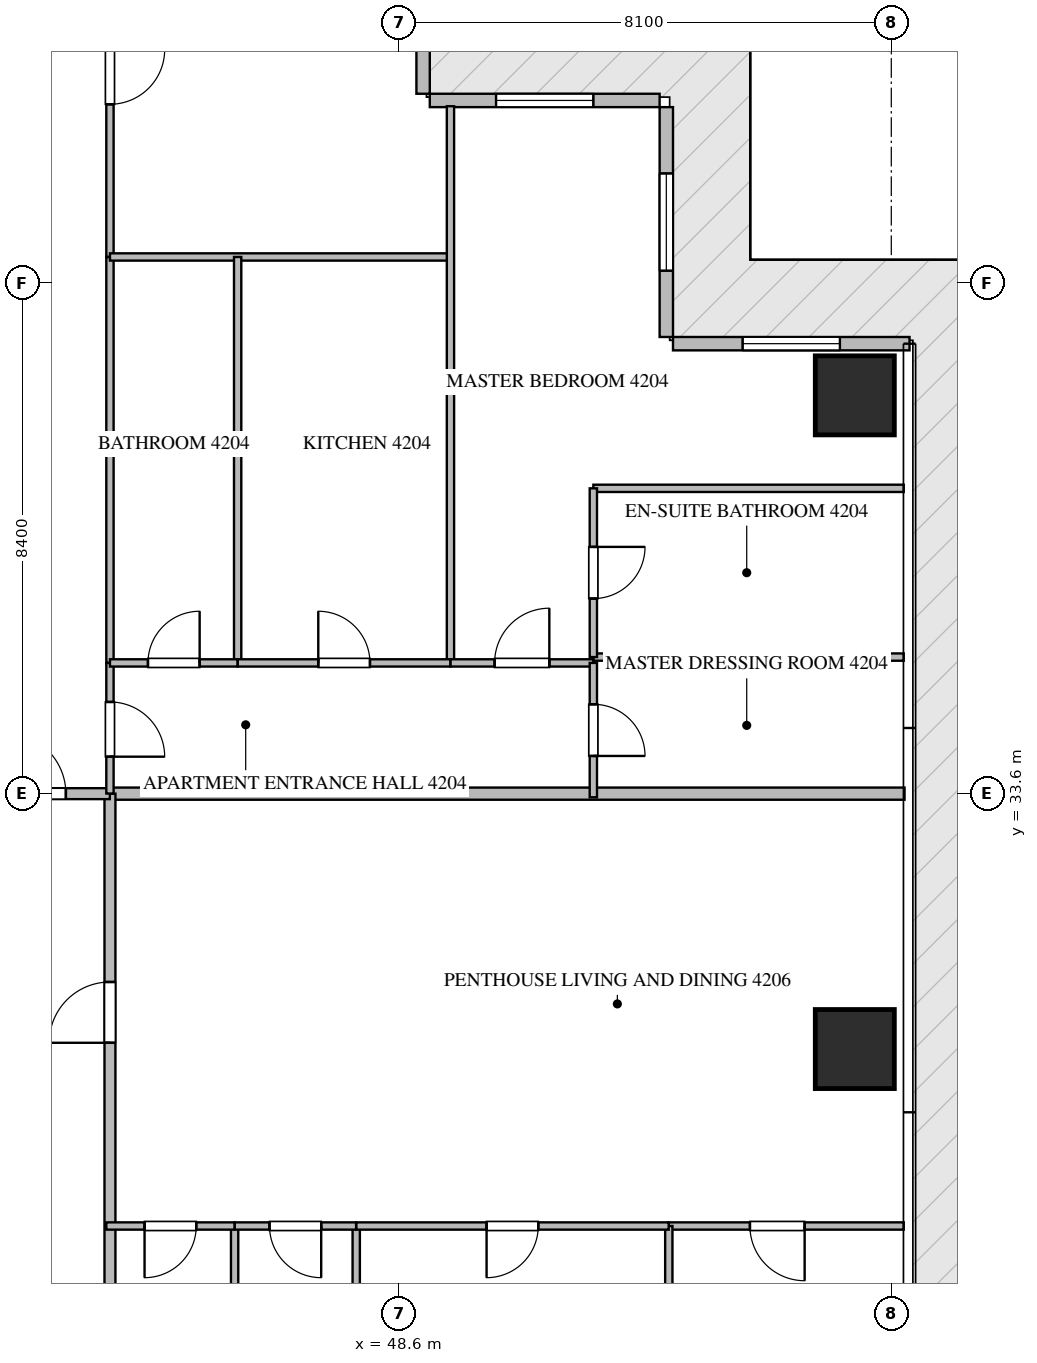
"""IFC4 building model, lengths in metres.
Left out: names, types, materials, properties, quantities, classifications, styles, units other than length and angle.
Written with IfcOpenShell. Run it as: python <this file> out.ifc"""

import sys

from ifc_helpers import new_model, si_unit, direction, frame, frame_2d, origin, origin_2d, place, context, subcontext, project, spatial, rectangle, extrude, source, transform, mapped, element, fill, save


model = new_model("IFC4")
c1 = context("Model", 3, precision=1e-05, world=origin(), true_north=direction((0.0, 1.0)))
c2 = subcontext(c1, "Body", "Model", "MODEL_VIEW")
j1 = project(units=[si_unit("LENGTHUNIT", "METRE"), si_unit("PLANEANGLEUNIT", "RADIAN")], contexts=[c1])
p1 = place(None, origin())
s1 = spatial("IfcSite", under=j1, at=p1, CompositionType="ELEMENT")
p2 = place(p1, origin())
s2 = spatial("IfcBuilding", under=s1, at=p2, CompositionType="ELEMENT")
p3 = place(p2, frame((0.0, 0.0, 168.9)))
s3 = spatial("IfcBuildingStorey", under=s2, at=p3, CompositionType="ELEMENT", Elevation=168.9)
m1 = source(origin(), c2, "Body", "SweptSolid", [
    extrude(rectangle(XDim=1.3, YDim=1.3, at=origin_2d()), origin(), (0.0, 0.0, 1.0), 3.75),
])
for number, where, z_axis, x_axis in (
    (1, (56.1, 29.4, -0.26), (0.0, 0.0, 1.0), (1.0, 0.0, 0.0)),
    (2, (56.1, 40.15, -0.26), (0.0, 0.0, 1.0), (1.0, 0.0, 0.0)),
):
    element("IfcColumn", number, at=place(p3, frame(where, z_axis=z_axis, x_axis=x_axis)), inside=s3, PredefinedType="COLUMN", context=c2, shape_type="MappedRepresentation", body=[
        mapped(m1, transform((0.0, 0.0, 0.0), scale=1.0)),
    ])
p4 = place(p3, frame((57.0, 41.0, 0.0), z_axis=(0.0, 0.0, 1.0), x_axis=(-1.0, 0.0, 0.0)))
e3 = element("IfcWall", 3, at=p4, inside=s3, PredefinedType="ELEMENTEDWALL", context=c2, shape_type="SweptSolid", body=[
    extrude(rectangle(XDim=3.89, YDim=0.22, at=frame_2d((1.945, 0.0))), origin(), (0.0, 0.0, 1.0), 3.475),
])
p5 = place(p4, frame((1.145, 0.0, 0.65)))
e4 = element("IfcOpeningElement", 4, at=p5, cuts=e3, PredefinedType="OPENING", context=c2, shape_type="SweptSolid", body=[
    extrude(rectangle(XDim=1.6, YDim=2.1, at=frame_2d((0.8, 1.05))), frame((0.0, 0.12, 0.0), z_axis=(0.0, -1.0, 0.0), x_axis=(1.0, 0.0, 0.0)), (0.0, 0.0, 1.0), 0.24),
])
p6 = place(p3, frame((53.0, 41.11, 0.0), z_axis=(0.0, 0.0, 1.0), x_axis=(0.0, 1.0, 0.0)))
e5 = element("IfcWall", 5, at=p6, inside=s3, PredefinedType="ELEMENTEDWALL", context=c2, shape_type="SweptSolid", body=[
    extrude(rectangle(XDim=3.78, YDim=0.22, at=frame_2d((1.89, 0.0))), origin(), (0.0, 0.0, 1.0), 3.475),
])
p7 = place(p6, frame((1.09, 0.0, 0.65)))
e6 = element("IfcOpeningElement", 6, at=p7, cuts=e5, PredefinedType="OPENING", context=c2, shape_type="SweptSolid", body=[
    extrude(rectangle(XDim=1.6, YDim=2.1, at=frame_2d((0.8, 1.05))), frame((0.0, 0.12, 0.0), z_axis=(0.0, -1.0, 0.0), x_axis=(1.0, 0.0, 0.0)), (0.0, 0.0, 1.0), 0.24),
])
p8 = place(p3, frame((52.89, 45.0, 0.0), z_axis=(0.0, 0.0, 1.0), x_axis=(-1.0, 0.0, 0.0)))
e7 = element("IfcWall", 7, at=p8, inside=s3, PredefinedType="ELEMENTEDWALL", context=c2, shape_type="SweptSolid", body=[
    extrude(rectangle(XDim=3.78, YDim=0.22, at=frame_2d((1.89, 0.0))), origin(), (0.0, 0.0, 1.0), 3.475),
])
p9 = place(p8, frame((1.09, 0.0, 0.65)))
e8 = element("IfcOpeningElement", 8, at=p9, cuts=e7, PredefinedType="OPENING", context=c2, shape_type="SweptSolid", body=[
    extrude(rectangle(XDim=1.6, YDim=2.1, at=frame_2d((0.8, 1.05))), frame((0.0, 0.12, 0.0), z_axis=(0.0, -1.0, 0.0), x_axis=(1.0, 0.0, 0.0)), (0.0, 0.0, 1.0), 0.24),
])
p10 = place(p3, frame((49.0, 45.11, 0.0), z_axis=(0.0, 0.0, 1.0), x_axis=(0.0, 1.0, 0.0)))
e9 = element("IfcWall", 9, at=p10, inside=s3, PredefinedType="ELEMENTEDWALL", context=c2, shape_type="SweptSolid", body=[
    extrude(rectangle(XDim=3.89, YDim=0.22, at=frame_2d((1.945, 0.0))), origin(), (0.0, 0.0, 1.0), 3.475),
])
p11 = place(p10, frame((1.145, 0.0, 0.65)))
e10 = element("IfcOpeningElement", 10, at=p11, cuts=e9, PredefinedType="OPENING", context=c2, shape_type="SweptSolid", body=[
    extrude(rectangle(XDim=1.6, YDim=2.1, at=frame_2d((0.8, 1.05))), frame((0.0, 0.12, 0.0), z_axis=(0.0, -1.0, 0.0), x_axis=(1.0, 0.0, 0.0)), (0.0, 0.0, 1.0), 0.24),
])
p12 = place(p3, frame((43.85, 33.6, 0.0), z_axis=(0.0, 0.0, 1.0), x_axis=(1.0, 0.0, 0.0)))
e11 = element("IfcWall", 11, at=p12, inside=s3, PredefinedType="PARTITIONING", context=c2, shape_type="SweptSolid", body=[
    extrude(rectangle(XDim=13.068, YDim=0.2, at=frame_2d((6.534, 0.0))), origin(), (0.0, 0.0, 1.0), 3.49),
])
p13 = place(p3, frame((43.85, 14.9, 0.0), z_axis=(0.0, 0.0, 1.0), x_axis=(0.0, 1.0, 0.0)))
e12 = element("IfcWall", 12, at=p13, inside=s3, PredefinedType="PARTITIONING", context=c2, shape_type="SweptSolid", body=[
    extrude(rectangle(XDim=18.7, YDim=0.18, at=frame_2d((9.35, 0.0))), origin(), (0.0, 0.0, 1.0), 3.49),
])
p14 = place(p13, frame((14.603, 0.0, 0.0)))
e13 = element("IfcOpeningElement", 13, at=p14, cuts=e12, PredefinedType="OPENING", context=c2, shape_type="SweptSolid", body=[
    extrude(rectangle(XDim=1.0, YDim=2.15, at=frame_2d((0.5, 1.075))), frame((0.0, 0.1, 0.0), z_axis=(0.0, -1.0, 0.0), x_axis=(1.0, 0.0, 0.0)), (0.0, 0.0, 1.0), 0.2),
])
p15 = place(p3, frame((41.402, 33.6, 0.0), z_axis=(0.0, 0.0, 1.0), x_axis=(1.0, 0.0, 0.0)))
e14 = element("IfcWall", 14, at=p15, inside=s3, PredefinedType="PARTITIONING", context=c2, shape_type="SweptSolid", body=[
    extrude(rectangle(XDim=2.446, YDim=0.18, at=frame_2d((1.223, 0.0))), origin(), (0.0, 0.0, 1.0), 3.49),
])
p16 = place(p15, frame((0.723, 0.0, 0.0)))
e15 = element("IfcOpeningElement", 15, at=p16, cuts=e14, PredefinedType="OPENING", context=c2, shape_type="SweptSolid", body=[
    extrude(rectangle(XDim=1.0, YDim=2.15, at=frame_2d((0.5, 1.075))), frame((0.0, 0.1, 0.0), z_axis=(0.0, -1.0, 0.0), x_axis=(1.0, 0.0, 0.0)), (0.0, 0.0, 1.0), 0.2),
])
p17 = place(p3, frame((43.85, 35.75, 0.0), z_axis=(0.0, 0.0, 1.0), x_axis=(0.0, -1.0, 0.0)))
e16 = element("IfcWall", 16, at=p17, inside=s3, PredefinedType="PARTITIONING", context=c2, shape_type="SweptSolid", body=[
    extrude(rectangle(XDim=2.148, YDim=0.12, at=frame_2d((1.074, 0.0))), origin(), (0.0, 0.0, 1.0), 3.49),
])
p18 = place(p17, frame((0.642, 0.0, 0.0)))
e17 = element("IfcOpeningElement", 17, at=p18, cuts=e16, PredefinedType="OPENING", context=c2, shape_type="SweptSolid", body=[
    extrude(rectangle(XDim=0.9, YDim=2.1, at=frame_2d((0.45, 1.05))), frame((0.0, 0.07, 0.0), z_axis=(0.0, -1.0, 0.0), x_axis=(1.0, 0.0, 0.0)), (0.0, 0.0, 1.0), 0.14),
])
p19 = place(p3, frame((43.85, 48.905, 0.0), z_axis=(0.0, 0.0, 1.0), x_axis=(0.0, -1.0, 0.0)))
e18 = element("IfcWall", 18, at=p19, inside=s3, PredefinedType="PARTITIONING", context=c2, shape_type="SweptSolid", body=[
    extrude(rectangle(XDim=6.479, YDim=0.12, at=frame_2d((3.24, 0.0))), origin(), (0.0, 0.0, 1.0), 3.49),
])
p20 = place(p19, frame((3.068, 0.0, 0.0)))
e19 = element("IfcOpeningElement", 19, at=p20, cuts=e18, PredefinedType="OPENING", context=c2, shape_type="SweptSolid", body=[
    extrude(rectangle(XDim=0.9, YDim=2.1, at=frame_2d((0.45, 1.05))), frame((0.0, 0.07, 0.0), z_axis=(0.0, -1.0, 0.0), x_axis=(1.0, 0.0, 0.0)), (0.0, 0.0, 1.0), 0.14),
])
p21 = place(p3, frame((43.85, 42.424, 0.0), z_axis=(0.0, 0.0, 1.0), x_axis=(0.0, -1.0, 0.0)))
e20 = element("IfcWall", 20, at=p21, inside=s3, PredefinedType="PARTITIONING", context=c2, shape_type="SweptSolid", body=[
    extrude(rectangle(XDim=6.672, YDim=0.12, at=frame_2d((3.336, 0.0))), origin(), (0.0, 0.0, 1.0), 3.49),
])
p22 = place(p3, frame((43.85, 42.426, 0.0), z_axis=(0.0, 0.0, 1.0), x_axis=(1.0, 0.0, 0.0)))
e21 = element("IfcWall", 21, at=p22, inside=s3, PredefinedType="PARTITIONING", context=c2, shape_type="SweptSolid", body=[
    extrude(rectangle(XDim=5.6, YDim=0.12, at=frame_2d((2.8, 0.0))), origin(), (0.0, 0.0, 1.0), 3.49),
])
p23 = place(p3, frame((49.45, 44.905, 0.0), z_axis=(0.0, 0.0, 1.0), x_axis=(0.0, -1.0, 0.0)))
e22 = element("IfcWall", 22, at=p23, inside=s3, PredefinedType="PARTITIONING", context=c2, shape_type="SweptSolid", body=[
    extrude(rectangle(XDim=9.155, YDim=0.12, at=frame_2d((4.578, 0.0))), origin(), (0.0, 0.0, 1.0), 3.49),
])
p24 = place(p3, frame((45.95, 42.426, 0.0), z_axis=(0.0, 0.0, 1.0), x_axis=(0.0, -1.0, 0.0)))
e23 = element("IfcWall", 23, at=p24, inside=s3, PredefinedType="PARTITIONING", context=c2, shape_type="SweptSolid", body=[
    extrude(rectangle(XDim=6.676, YDim=0.12, at=frame_2d((3.338, 0.0))), origin(), (0.0, 0.0, 1.0), 3.49),
])
p25 = place(p3, frame((43.85, 35.75, 0.0), z_axis=(0.0, 0.0, 1.0), x_axis=(1.0, 0.0, 0.0)))
e24 = element("IfcWall", 24, at=p25, inside=s3, PredefinedType="PARTITIONING", context=c2, shape_type="SweptSolid", body=[
    extrude(rectangle(XDim=2.1, YDim=0.12, at=frame_2d((1.05, 0.0))), origin(), (0.0, 0.0, 1.0), 3.49),
])
p26 = place(p25, frame((0.625, 0.0, 0.0)))
e25 = element("IfcOpeningElement", 25, at=p26, cuts=e24, PredefinedType="OPENING", context=c2, shape_type="SweptSolid", body=[
    extrude(rectangle(XDim=0.85, YDim=2.1, at=frame_2d((0.425, 1.05))), frame((0.0, 0.07, 0.0), z_axis=(0.0, -1.0, 0.0), x_axis=(1.0, 0.0, 0.0)), (0.0, 0.0, 1.0), 0.14),
])
p27 = place(p3, frame((45.952, 35.75, 0.0), z_axis=(0.0, 0.0, 1.0), x_axis=(1.0, 0.0, 0.0)))
e26 = element("IfcWall", 26, at=p27, inside=s3, PredefinedType="PARTITIONING", context=c2, shape_type="SweptSolid", body=[
    extrude(rectangle(XDim=3.498, YDim=0.12, at=frame_2d((1.749, 0.0))), origin(), (0.0, 0.0, 1.0), 3.49),
])
p28 = place(p27, frame((1.324, 0.0, 0.0)))
e27 = element("IfcOpeningElement", 27, at=p28, cuts=e26, PredefinedType="OPENING", context=c2, shape_type="SweptSolid", body=[
    extrude(rectangle(XDim=0.85, YDim=2.1, at=frame_2d((0.425, 1.05))), frame((0.0, 0.07, 0.0), z_axis=(0.0, -1.0, 0.0), x_axis=(1.0, 0.0, 0.0)), (0.0, 0.0, 1.0), 0.14),
])
p29 = place(p3, frame((49.452, 35.75, 0.0), z_axis=(0.0, 0.0, 1.0), x_axis=(1.0, 0.0, 0.0)))
e28 = element("IfcWall", 28, at=p29, inside=s3, PredefinedType="PARTITIONING", context=c2, shape_type="SweptSolid", body=[
    extrude(rectangle(XDim=2.348, YDim=0.12, at=frame_2d((1.174, 0.0))), origin(), (0.0, 0.0, 1.0), 3.49),
])
p30 = place(p29, frame((0.724, 0.0, 0.0)))
e29 = element("IfcOpeningElement", 29, at=p30, cuts=e28, PredefinedType="OPENING", context=c2, shape_type="SweptSolid", body=[
    extrude(rectangle(XDim=0.9, YDim=2.1, at=frame_2d((0.45, 1.05))), frame((0.0, 0.07, 0.0), z_axis=(0.0, -1.0, 0.0), x_axis=(1.0, 0.0, 0.0)), (0.0, 0.0, 1.0), 0.14),
])
p31 = place(p3, frame((51.8, 38.621, 0.0), z_axis=(0.0, 0.0, 1.0), x_axis=(1.0, 0.0, 0.0)))
e30 = element("IfcWall", 30, at=p31, inside=s3, PredefinedType="PARTITIONING", context=c2, shape_type="SweptSolid", body=[
    extrude(rectangle(XDim=5.105, YDim=0.12, at=frame_2d((2.552, 0.0))), origin(), (0.0, 0.0, 1.0), 3.49),
])
p32 = place(p3, frame((51.802, 35.846, 0.0), z_axis=(0.0, 0.0, 1.0), x_axis=(1.0, 0.0, 0.0)))
e31 = element("IfcWall", 31, at=p32, inside=s3, PredefinedType="PARTITIONING", context=c2, shape_type="SweptSolid", body=[
    extrude(rectangle(XDim=5.103, YDim=0.12, at=frame_2d((2.552, 0.0))), origin(), (0.0, 0.0, 1.0), 3.49),
])
p33 = place(p3, frame((51.8, 38.621, 0.0), z_axis=(0.0, 0.0, 1.0), x_axis=(0.0, -1.0, 0.0)))
e32 = element("IfcWall", 32, at=p33, inside=s3, PredefinedType="PARTITIONING", context=c2, shape_type="SweptSolid", body=[
    extrude(rectangle(XDim=2.775, YDim=0.12, at=frame_2d((1.388, 0.0))), origin(), (0.0, 0.0, 1.0), 3.49),
])
p34 = place(p33, frame((0.963, 0.0, 0.0)))
e33 = element("IfcOpeningElement", 33, at=p34, cuts=e32, PredefinedType="OPENING", context=c2, shape_type="SweptSolid", body=[
    extrude(rectangle(XDim=0.85, YDim=2.1, at=frame_2d((0.425, 1.05))), frame((0.0, 0.07, 0.0), z_axis=(0.0, -1.0, 0.0), x_axis=(1.0, 0.0, 0.0)), (0.0, 0.0, 1.0), 0.14),
])
p35 = place(p3, frame((51.8, 35.75, 0.0), z_axis=(0.0, 0.0, 1.0), x_axis=(0.0, -1.0, 0.0)))
e34 = element("IfcWall", 34, at=p35, inside=s3, PredefinedType="PARTITIONING", context=c2, shape_type="SweptSolid", body=[
    extrude(rectangle(XDim=2.21, YDim=0.12, at=frame_2d((1.105, 0.0))), origin(), (0.0, 0.0, 1.0), 3.49),
])
p36 = place(p35, frame((0.68, 0.0, 0.0)))
e35 = element("IfcOpeningElement", 35, at=p36, cuts=e34, PredefinedType="OPENING", context=c2, shape_type="SweptSolid", body=[
    extrude(rectangle(XDim=0.85, YDim=2.1, at=frame_2d((0.425, 1.05))), frame((0.0, 0.07, 0.0), z_axis=(0.0, -1.0, 0.0), x_axis=(1.0, 0.0, 0.0)), (0.0, 0.0, 1.0), 0.14),
])
p37 = place(p3, frame((56.905, 26.49, 0.0), z_axis=(0.0, 0.0, 1.0), x_axis=(-1.0, 0.0, 0.0)))
e36 = element("IfcWall", 36, at=p37, inside=s3, PredefinedType="PARTITIONING", context=c2, shape_type="SweptSolid", body=[
    extrude(rectangle(XDim=3.864, YDim=0.12, at=frame_2d((1.932, 0.0))), origin(), (0.0, 0.0, 1.0), 3.49),
])
p38 = place(p37, frame((1.63, 0.0, 0.0)))
e37 = element("IfcOpeningElement", 37, at=p38, cuts=e36, PredefinedType="OPENING", context=c2, shape_type="SweptSolid", body=[
    extrude(rectangle(XDim=0.9, YDim=2.1, at=frame_2d((0.45, 1.05))), frame((0.0, 0.07, 0.0), z_axis=(0.0, -1.0, 0.0), x_axis=(1.0, 0.0, 0.0)), (0.0, 0.0, 1.0), 0.14),
])
p39 = place(p3, frame((53.041, 14.84, 0.0), z_axis=(0.0, 0.0, 1.0), x_axis=(0.0, 1.0, 0.0)))
e38 = element("IfcWall", 38, at=p39, inside=s3, PredefinedType="PARTITIONING", context=c2, shape_type="SweptSolid", body=[
    extrude(rectangle(XDim=11.65, YDim=0.12, at=frame_2d((5.825, 0.0))), origin(), (0.0, 0.0, 1.0), 3.49),
])
p40 = place(p3, frame((47.9, 14.84, 0.0), z_axis=(0.0, 0.0, 1.0), x_axis=(0.0, 1.0, 0.0)))
e39 = element("IfcWall", 39, at=p40, inside=s3, PredefinedType="PARTITIONING", context=c2, shape_type="SweptSolid", body=[
    extrude(rectangle(XDim=11.65, YDim=0.12, at=frame_2d((5.825, 0.0))), origin(), (0.0, 0.0, 1.0), 2.972),
])
p41 = place(p3, frame((45.9, 23.29, 0.0), z_axis=(0.0, 0.0, 1.0), x_axis=(0.0, 1.0, 0.0)))
e40 = element("IfcWall", 40, at=p41, inside=s3, PredefinedType="PARTITIONING", context=c2, shape_type="SweptSolid", body=[
    extrude(rectangle(XDim=3.2, YDim=0.12, at=frame_2d((1.6, 0.0))), origin(), (0.0, 0.0, 1.0), 3.49),
])
p42 = place(p3, frame((53.039, 26.49, 0.0), z_axis=(0.0, 0.0, 1.0), x_axis=(-1.0, 0.0, 0.0)))
e41 = element("IfcWall", 41, at=p42, inside=s3, PredefinedType="PARTITIONING", context=c2, shape_type="SweptSolid", body=[
    extrude(rectangle(XDim=5.139, YDim=0.12, at=frame_2d((2.57, 0.0))), origin(), (0.0, 0.0, 1.0), 3.49),
])
p43 = place(p42, frame((2.145, 0.0, 0.0)))
e42 = element("IfcOpeningElement", 42, at=p43, cuts=e41, PredefinedType="OPENING", context=c2, shape_type="SweptSolid", body=[
    extrude(rectangle(XDim=0.85, YDim=2.1, at=frame_2d((0.425, 1.05))), frame((0.0, 0.07, 0.0), z_axis=(0.0, -1.0, 0.0), x_axis=(1.0, 0.0, 0.0)), (0.0, 0.0, 1.0), 0.14),
])
p44 = place(p3, frame((47.898, 26.49, 0.0), z_axis=(0.0, 0.0, 1.0), x_axis=(-1.0, 0.0, 0.0)))
e43 = element("IfcWall", 43, at=p44, inside=s3, PredefinedType="PARTITIONING", context=c2, shape_type="SweptSolid", body=[
    extrude(rectangle(XDim=1.998, YDim=0.12, at=frame_2d((0.999, 0.0))), origin(), (0.0, 0.0, 1.0), 3.49),
])
p45 = place(p44, frame((0.574, 0.0, 0.0)))
e44 = element("IfcOpeningElement", 44, at=p45, cuts=e43, PredefinedType="OPENING", context=c2, shape_type="SweptSolid", body=[
    extrude(rectangle(XDim=0.85, YDim=2.1, at=frame_2d((0.425, 1.05))), frame((0.0, 0.07, 0.0), z_axis=(0.0, -1.0, 0.0), x_axis=(1.0, 0.0, 0.0)), (0.0, 0.0, 1.0), 0.14),
])
p46 = place(p3, frame((45.898, 26.49, 0.0), z_axis=(0.0, 0.0, 1.0), x_axis=(-1.0, 0.0, 0.0)))
e45 = element("IfcWall", 45, at=p46, inside=s3, PredefinedType="PARTITIONING", context=c2, shape_type="SweptSolid", body=[
    extrude(rectangle(XDim=2.108, YDim=0.12, at=frame_2d((1.054, 0.0))), origin(), (0.0, 0.0, 1.0), 3.49),
])
p47 = place(p46, frame((0.629, 0.0, 0.0)))
e46 = element("IfcOpeningElement", 46, at=p47, cuts=e45, PredefinedType="OPENING", context=c2, shape_type="SweptSolid", body=[
    extrude(rectangle(XDim=0.85, YDim=2.1, at=frame_2d((0.425, 1.05))), frame((0.0, 0.07, 0.0), z_axis=(0.0, -1.0, 0.0), x_axis=(1.0, 0.0, 0.0)), (0.0, 0.0, 1.0), 0.14),
])
m2 = source(origin(), c2, "Body", "SweptSolid", [
    extrude(rectangle(XDim=1.6, YDim=2.1, at=frame_2d((0.8, 1.05))), frame((0.0, 0.03, 0.0), z_axis=(0.0, -1.0, 0.0), x_axis=(1.0, 0.0, 0.0)), (0.0, 0.0, 1.0), 0.06),
])
p48 = place(p5, origin())
e47 = element("IfcWindow", 47, at=p48, inside=s3, PartitioningType="SINGLE_PANEL", PredefinedType="WINDOW", context=c2, shape_type="MappedRepresentation", body=[
    mapped(m2, transform((0.0, 0.0, 0.0), scale=1.0)),
])
fill(e4, e47)
p49 = place(p7, origin())
e48 = element("IfcWindow", 48, at=p49, inside=s3, PartitioningType="SINGLE_PANEL", PredefinedType="WINDOW", context=c2, shape_type="MappedRepresentation", body=[
    mapped(m2, transform((0.0, 0.0, 0.0), scale=1.0)),
])
fill(e6, e48)
p50 = place(p9, origin())
e49 = element("IfcWindow", 49, at=p50, inside=s3, PartitioningType="SINGLE_PANEL", PredefinedType="WINDOW", context=c2, shape_type="MappedRepresentation", body=[
    mapped(m2, transform((0.0, 0.0, 0.0), scale=1.0)),
])
fill(e8, e49)
m3 = source(origin(), c2, "Body", "SweptSolid", [
    extrude(rectangle(XDim=1.0, YDim=2.15, at=frame_2d((0.5, 1.075))), frame((0.0, 0.025, 0.0), z_axis=(0.0, -1.0, 0.0), x_axis=(1.0, 0.0, 0.0)), (0.0, 0.0, 1.0), 0.05),
])
p51 = place(p14, origin())
e50 = element("IfcDoor", 50, at=p51, inside=s3, OperationType="SINGLE_SWING_LEFT", PredefinedType="DOOR", context=c2, shape_type="MappedRepresentation", body=[
    mapped(m3, transform((0.0, 0.0, 0.0), scale=1.0)),
])
fill(e13, e50)
p52 = place(p16, origin())
e51 = element("IfcDoor", 51, at=p52, inside=s3, OperationType="SINGLE_SWING_LEFT", PredefinedType="DOOR", context=c2, shape_type="MappedRepresentation", body=[
    mapped(m3, transform((0.0, 0.0, 0.0), scale=1.0)),
])
fill(e15, e51)
m4 = source(origin(), c2, "Body", "SweptSolid", [
    extrude(rectangle(XDim=0.9, YDim=2.1, at=frame_2d((0.45, 1.05))), frame((0.0, 0.025, 0.0), z_axis=(0.0, -1.0, 0.0), x_axis=(1.0, 0.0, 0.0)), (0.0, 0.0, 1.0), 0.05),
])
p53 = place(p18, origin())
e52 = element("IfcDoor", 52, at=p53, inside=s3, OperationType="SINGLE_SWING_RIGHT", PredefinedType="DOOR", context=c2, shape_type="MappedRepresentation", body=[
    mapped(m4, transform((0.0, 0.0, 0.0), scale=1.0)),
])
fill(e17, e52)
p54 = place(p20, origin())
e53 = element("IfcDoor", 53, at=p54, inside=s3, OperationType="SINGLE_SWING_LEFT", PredefinedType="DOOR", context=c2, shape_type="MappedRepresentation", body=[
    mapped(m4, transform((0.0, 0.0, 0.0), scale=1.0)),
])
fill(e19, e53)
m5 = source(origin(), c2, "Body", "SweptSolid", [
    extrude(rectangle(XDim=0.85, YDim=2.1, at=frame_2d((0.425, 1.05))), frame((0.0, 0.025, 0.0), z_axis=(0.0, -1.0, 0.0), x_axis=(1.0, 0.0, 0.0)), (0.0, 0.0, 1.0), 0.05),
])
p55 = place(p26, origin())
e54 = element("IfcDoor", 54, at=p55, inside=s3, OperationType="SINGLE_SWING_RIGHT", PredefinedType="DOOR", context=c2, shape_type="MappedRepresentation", body=[
    mapped(m5, transform((0.0, 0.0, 0.0), scale=1.0)),
])
fill(e25, e54)
p56 = place(p28, origin())
e55 = element("IfcDoor", 55, at=p56, inside=s3, OperationType="SINGLE_SWING_LEFT", PredefinedType="DOOR", context=c2, shape_type="MappedRepresentation", body=[
    mapped(m5, transform((0.0, 0.0, 0.0), scale=1.0)),
])
fill(e27, e55)
p57 = place(p30, origin())
e56 = element("IfcDoor", 56, at=p57, inside=s3, OperationType="SINGLE_SWING_RIGHT", PredefinedType="DOOR", context=c2, shape_type="MappedRepresentation", body=[
    mapped(m4, transform((0.0, 0.0, 0.0), scale=1.0)),
])
fill(e29, e56)
p58 = place(p34, origin())
e57 = element("IfcDoor", 57, at=p58, inside=s3, OperationType="SINGLE_SWING_LEFT", PredefinedType="DOOR", context=c2, shape_type="MappedRepresentation", body=[
    mapped(m5, transform((0.0, 0.0, 0.0), scale=1.0)),
])
fill(e33, e57)
p59 = place(p36, origin())
e58 = element("IfcDoor", 58, at=p59, inside=s3, OperationType="SINGLE_SWING_RIGHT", PredefinedType="DOOR", context=c2, shape_type="MappedRepresentation", body=[
    mapped(m5, transform((0.0, 0.0, 0.0), scale=1.0)),
])
fill(e35, e58)
p60 = place(p38, origin())
e59 = element("IfcDoor", 59, at=p60, inside=s3, OperationType="SINGLE_SWING_LEFT", PredefinedType="DOOR", context=c2, shape_type="MappedRepresentation", body=[
    mapped(m4, transform((0.0, 0.0, 0.0), scale=1.0)),
])
fill(e37, e59)
p61 = place(p43, origin())
e60 = element("IfcDoor", 60, at=p61, inside=s3, OperationType="SINGLE_SWING_RIGHT", PredefinedType="DOOR", context=c2, shape_type="MappedRepresentation", body=[
    mapped(m5, transform((0.0, 0.0, 0.0), scale=1.0)),
])
fill(e42, e60)
p62 = place(p45, origin())
e61 = element("IfcDoor", 61, at=p62, inside=s3, OperationType="SINGLE_SWING_LEFT", PredefinedType="DOOR", context=c2, shape_type="MappedRepresentation", body=[
    mapped(m5, transform((0.0, 0.0, 0.0), scale=1.0)),
])
fill(e44, e61)
p63 = place(p47, origin())
e62 = element("IfcDoor", 62, at=p63, inside=s3, OperationType="SINGLE_SWING_RIGHT", PredefinedType="DOOR", context=c2, shape_type="MappedRepresentation", body=[
    mapped(m5, transform((0.0, 0.0, 0.0), scale=1.0)),
])
fill(e46, e62)
save(model, sys.argv[1])
